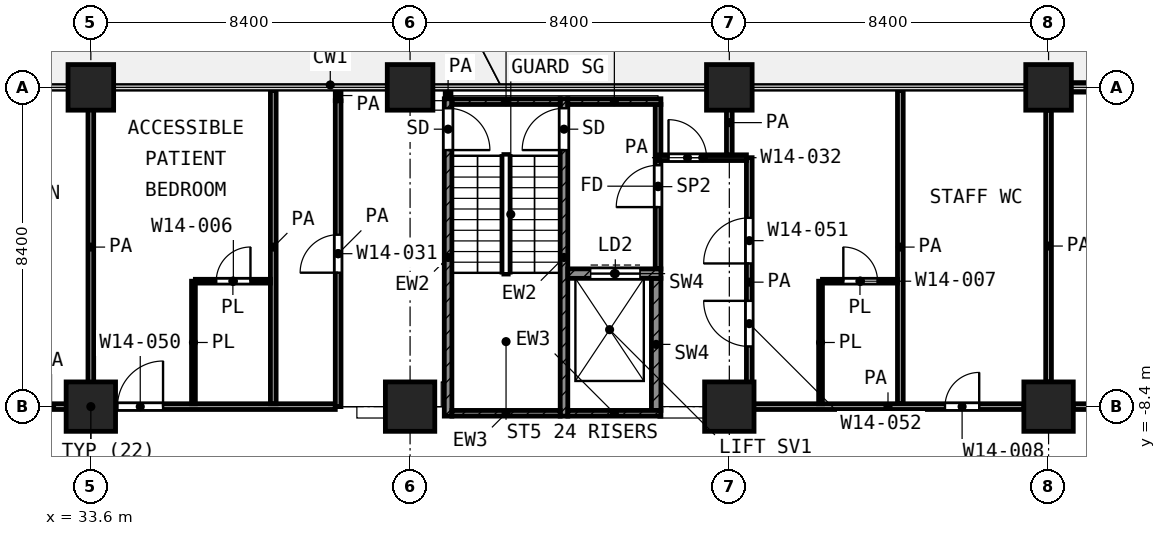
"""IFC4 building model, lengths in metres.
Left out: names, types, materials, properties, quantities, classifications, styles, units other than length and angle.
Written with IfcOpenShell. Run it as: python <this file> out.ifc"""

import sys

from ifc_helpers import new_model, si_unit, direction, frame, frame_2d, origin, origin_2d, place, context, subcontext, project, spatial, rectangle, extrude, element, fill, save


model = new_model("IFC4")
c1 = context("Model", 3, precision=1e-05, world=origin(), true_north=direction((0.0, 1.0)))
c2 = subcontext(c1, "Body", "Model", "MODEL_VIEW")
j1 = project(units=[si_unit("LENGTHUNIT", "METRE"), si_unit("PLANEANGLEUNIT", "RADIAN")], contexts=[c1])
p1 = place(None, origin())
s1 = spatial("IfcSite", under=j1, at=p1, CompositionType="ELEMENT")
p2 = place(p1, origin())
s2 = spatial("IfcBuilding", under=s1, at=p2, CompositionType="ELEMENT")
p3 = place(p2, frame((0.0, 0.0, 64.4)))
s3 = spatial("IfcBuildingStorey", under=s2, at=p3, CompositionType="ELEMENT", Elevation=64.4)
for number, where, z_axis, x_axis in (
    (1, (33.6, 0.0, 0.0), (0.0, 0.0, 1.0), (1.0, 0.0, 0.0)),
    (2, (42.0, 0.0, 0.0), (0.0, 0.0, 1.0), (1.0, 0.0, 0.0)),
    (3, (50.4, 0.0, 0.0), (0.0, 0.0, 1.0), (1.0, 0.0, 0.0)),
    (4, (58.8, 0.0, 0.0), (0.0, 0.0, 1.0), (1.0, 0.0, 0.0)),
):
    element("IfcColumn", number, at=place(p3, frame(where, z_axis=z_axis, x_axis=x_axis)), inside=s3, PredefinedType="COLUMN", context=c2, shape_type="SweptSolid", body=[
        extrude(rectangle(XDim=1.2, YDim=1.2, at=origin_2d()), origin(), (0.0, 0.0, 1.0), 4.2),
    ])
for number, where, z_axis, x_axis in (
    (5, (33.6, -8.4, 0.0), (0.0, 0.0, 1.0), (1.0, 0.0, 0.0)),
    (6, (42.0, -8.4, 0.0), (0.0, 0.0, 1.0), (1.0, 0.0, 0.0)),
    (7, (50.4, -8.4, 0.0), (0.0, 0.0, 1.0), (1.0, 0.0, 0.0)),
    (8, (58.8, -8.4, 0.0), (0.0, 0.0, 1.0), (1.0, 0.0, 0.0)),
):
    element("IfcColumn", number, at=place(p3, frame(where, z_axis=z_axis, x_axis=x_axis)), inside=s3, PredefinedType="COLUMN", context=c2, shape_type="SweptSolid", body=[
        extrude(rectangle(XDim=1.3, YDim=1.3, at=origin_2d()), origin(), (0.0, 0.0, 1.0), 4.2),
    ])
p4 = place(p3, frame((63.0, 0.0, 0.0), z_axis=(0.0, 0.0, 1.0), x_axis=(-1.0, 0.0, 0.0)))
e9 = element("IfcWall", 9, at=p4, inside=s3, PredefinedType="SOLIDWALL", context=c2, shape_type="SweptSolid", body=[
    extrude(rectangle(XDim=3.6, YDim=0.25, at=frame_2d((1.8, 0.0))), origin(), (0.0, 0.0, 1.0), 3.78),
])
p5 = place(p4, frame((0.9, 0.0, 0.0)))
e10 = element("IfcOpeningElement", 10, at=p5, cuts=e9, PredefinedType="OPENING", context=c2, shape_type="SweptSolid", body=[
    extrude(rectangle(XDim=1.8, YDim=2.1, at=frame_2d((0.9, 1.05))), frame((0.0, 0.135, 0.0), z_axis=(0.0, -1.0, 0.0), x_axis=(1.0, 0.0, 0.0)), (0.0, 0.0, 1.0), 0.27),
])
p6 = place(p3, frame((43.0, -8.65, 0.0), z_axis=(0.0, 0.0, 1.0), x_axis=(0.0, 1.0, 0.0)))
e11 = element("IfcWall", 11, at=p6, inside=s3, PredefinedType="SHEAR", context=c2, shape_type="SweptSolid", body=[
    extrude(rectangle(XDim=8.35, YDim=0.2, at=frame_2d((4.175, 0.0))), origin(), (0.0, 0.0, 1.0), 3.9),
])
p7 = place(p6, frame((7.0, 0.0, 0.0)))
e12 = element("IfcOpeningElement", 12, at=p7, cuts=e11, PredefinedType="OPENING", context=c2, shape_type="SweptSolid", body=[
    extrude(rectangle(XDim=1.1, YDim=2.1, at=frame_2d((0.55, 1.05))), frame((0.0, 0.11, 0.0), z_axis=(0.0, -1.0, 0.0), x_axis=(1.0, 0.0, 0.0)), (0.0, 0.0, 1.0), 0.22),
])
p8 = place(p3, frame((46.05, -8.65, 0.0), z_axis=(0.0, 0.0, 1.0), x_axis=(0.0, 1.0, 0.0)))
e13 = element("IfcWall", 13, at=p8, inside=s3, PredefinedType="SHEAR", context=c2, shape_type="SweptSolid", body=[
    extrude(rectangle(XDim=8.35, YDim=0.2, at=frame_2d((4.175, 0.0))), origin(), (0.0, 0.0, 1.0), 3.9),
])
p9 = place(p8, frame((7.0, 0.0, 0.0)))
e14 = element("IfcOpeningElement", 14, at=p9, cuts=e13, PredefinedType="OPENING", context=c2, shape_type="SweptSolid", body=[
    extrude(rectangle(XDim=1.1, YDim=2.1, at=frame_2d((0.55, 1.05))), frame((0.0, 0.11, 0.0), z_axis=(0.0, -1.0, 0.0), x_axis=(1.0, 0.0, 0.0)), (0.0, 0.0, 1.0), 0.22),
])
p10 = place(p3, frame((43.1, -0.375, 0.0), z_axis=(0.0, 0.0, 1.0), x_axis=(1.0, 0.0, 0.0)))
e15 = element("IfcWall", 15, at=p10, inside=s3, PredefinedType="SHEAR", context=c2, shape_type="SweptSolid", body=[
    extrude(rectangle(XDim=2.85, YDim=0.15, at=frame_2d((1.425, 0.0))), origin(), (0.0, 0.0, 1.0), 3.9),
])
p11 = place(p3, frame((46.15, -0.375, 0.0), z_axis=(0.0, 0.0, 1.0), x_axis=(1.0, 0.0, 0.0)))
e16 = element("IfcWall", 16, at=p11, inside=s3, PredefinedType="SHEAR", context=c2, shape_type="SweptSolid", body=[
    extrude(rectangle(XDim=2.45, YDim=0.15, at=frame_2d((1.225, 0.0))), origin(), (0.0, 0.0, 1.0), 3.9),
])
p12 = place(p3, frame((43.1, -8.575, 0.0), z_axis=(0.0, 0.0, 1.0), x_axis=(1.0, 0.0, 0.0)))
e17 = element("IfcWall", 17, at=p12, inside=s3, PredefinedType="SHEAR", context=c2, shape_type="SweptSolid", body=[
    extrude(rectangle(XDim=2.85, YDim=0.15, at=frame_2d((1.425, 0.0))), origin(), (0.0, 0.0, 1.0), 3.9),
])
p13 = place(p3, frame((46.15, -8.575, 0.0), z_axis=(0.0, 0.0, 1.0), x_axis=(1.0, 0.0, 0.0)))
e18 = element("IfcWall", 18, at=p13, inside=s3, PredefinedType="SHEAR", context=c2, shape_type="SweptSolid", body=[
    extrude(rectangle(XDim=2.45, YDim=0.15, at=frame_2d((1.225, 0.0))), origin(), (0.0, 0.0, 1.0), 3.9),
])
p14 = place(p3, frame((46.15, -4.9, 0.0), z_axis=(0.0, 0.0, 1.0), x_axis=(1.0, 0.0, 0.0)))
e19 = element("IfcWall", 19, at=p14, inside=s3, PredefinedType="SHEAR", context=c2, shape_type="SweptSolid", body=[
    extrude(rectangle(XDim=2.45, YDim=0.25, at=frame_2d((1.225, 0.0))), origin(), (0.0, 0.0, 1.0), 3.9),
])
p15 = place(p14, frame((0.6, 0.0, 0.0)))
e20 = element("IfcOpeningElement", 20, at=p15, cuts=e19, PredefinedType="OPENING", context=c2, shape_type="SweptSolid", body=[
    extrude(rectangle(XDim=1.3, YDim=2.1, at=frame_2d((0.65, 1.05))), frame((0.0, 0.135, 0.0), z_axis=(0.0, -1.0, 0.0), x_axis=(1.0, 0.0, 0.0)), (0.0, 0.0, 1.0), 0.27),
])
p16 = place(p3, frame((48.475, -8.5, 0.0), z_axis=(0.0, 0.0, 1.0), x_axis=(0.0, 1.0, 0.0)))
e21 = element("IfcWall", 21, at=p16, inside=s3, PredefinedType="SHEAR", context=c2, shape_type="SweptSolid", body=[
    extrude(rectangle(XDim=3.475, YDim=0.25, at=frame_2d((1.738, 0.0))), origin(), (0.0, 0.0, 1.0), 3.9),
])
p17 = place(p3, frame((48.525, -4.775, 0.0), z_axis=(0.0, 0.0, 1.0), x_axis=(0.0, 1.0, 0.0)))
e22 = element("IfcWall", 22, at=p17, inside=s3, PredefinedType="PARTITIONING", context=c2, shape_type="SweptSolid", body=[
    extrude(rectangle(XDim=4.325, YDim=0.15, at=frame_2d((2.163, 0.0))), origin(), (0.0, 0.0, 1.0), 3.9),
])
p18 = place(p17, frame((1.625, 0.0, 0.0)))
e23 = element("IfcOpeningElement", 23, at=p18, cuts=e22, PredefinedType="OPENING", context=c2, shape_type="SweptSolid", body=[
    extrude(rectangle(XDim=1.1, YDim=2.1, at=frame_2d((0.55, 1.05))), frame((0.0, 0.085, 0.0), z_axis=(0.0, -1.0, 0.0), x_axis=(1.0, 0.0, 0.0)), (0.0, 0.0, 1.0), 0.17),
])
p19 = place(p3, frame((36.35, -5.1, 0.0), z_axis=(0.0, 0.0, 1.0), x_axis=(1.0, 0.0, 0.0)))
e24 = element("IfcWall", 24, at=p19, inside=s3, PredefinedType="PARTITIONING", context=c2, shape_type="SweptSolid", body=[
    extrude(rectangle(XDim=1.975, YDim=0.1, at=frame_2d((0.987, 0.0))), origin(), (0.0, 0.0, 1.0), 3.9),
])
p20 = place(p19, frame((0.55, 0.0, 0.0)))
e25 = element("IfcOpeningElement", 25, at=p20, cuts=e24, PredefinedType="OPENING", context=c2, shape_type="SweptSolid", body=[
    extrude(rectangle(XDim=0.9, YDim=2.1, at=frame_2d((0.45, 1.05))), frame((0.0, 0.06, 0.0), z_axis=(0.0, -1.0, 0.0), x_axis=(1.0, 0.0, 0.0)), (0.0, 0.0, 1.0), 0.12),
])
p21 = place(p3, frame((52.85, -5.1, 0.0), z_axis=(0.0, 0.0, 1.0), x_axis=(1.0, 0.0, 0.0)))
e26 = element("IfcWall", 26, at=p21, inside=s3, PredefinedType="PARTITIONING", context=c2, shape_type="SweptSolid", body=[
    extrude(rectangle(XDim=1.975, YDim=0.1, at=frame_2d((0.987, 0.0))), origin(), (0.0, 0.0, 1.0), 3.9),
])
p22 = place(p21, frame((0.55, 0.0, 0.0)))
e27 = element("IfcOpeningElement", 27, at=p22, cuts=e26, PredefinedType="OPENING", context=c2, shape_type="SweptSolid", body=[
    extrude(rectangle(XDim=0.9, YDim=2.1, at=frame_2d((0.45, 1.05))), frame((0.0, 0.06, 0.0), z_axis=(0.0, -1.0, 0.0), x_axis=(1.0, 0.0, 0.0)), (0.0, 0.0, 1.0), 0.12),
])
for number, where, z_axis, x_axis in (
    (28, (36.3, -8.325, 0.0), (0.0, 0.0, 1.0), (0.0, 1.0, 0.0)),
    (29, (52.8, -8.325, 0.0), (0.0, 0.0, 1.0), (0.0, 1.0, 0.0)),
):
    element("IfcWall", number, at=place(p3, frame(where, z_axis=z_axis, x_axis=x_axis)), inside=s3, PredefinedType="PARTITIONING", context=c2, shape_type="SweptSolid", body=[
        extrude(rectangle(XDim=3.225, YDim=0.1, at=frame_2d((1.612, 0.0))), origin(), (0.0, 0.0, 1.0), 3.9),
    ])
p23 = place(p3, frame((25.1, -8.4, 0.0), z_axis=(0.0, 0.0, 1.0), x_axis=(1.0, 0.0, 0.0)))
e30 = element("IfcWall", 30, at=p23, inside=s3, PredefinedType="PARTITIONING", context=c2, shape_type="SweptSolid", body=[
    extrude(rectangle(XDim=14.932, YDim=0.15, at=frame_2d((7.466, 0.0))), origin(), (0.0, 0.0, 1.0), 3.9),
])
p24 = place(p23, frame((1.75, 0.0, 0.0)))
e31 = element("IfcOpeningElement", 31, at=p24, cuts=e30, PredefinedType="OPENING", context=c2, shape_type="SweptSolid", body=[
    extrude(rectangle(XDim=0.9, YDim=2.1, at=frame_2d((0.45, 1.05))), frame((0.0, 0.085, 0.0), z_axis=(0.0, -1.0, 0.0), x_axis=(1.0, 0.0, 0.0)), (0.0, 0.0, 1.0), 0.17),
])
p25 = place(p23, frame((5.8, 0.0, 0.0)))
e32 = element("IfcOpeningElement", 32, at=p25, cuts=e30, PredefinedType="OPENING", context=c2, shape_type="SweptSolid", body=[
    extrude(rectangle(XDim=1.2, YDim=2.1, at=frame_2d((0.6, 1.05))), frame((0.0, 0.085, 0.0), z_axis=(0.0, -1.0, 0.0), x_axis=(1.0, 0.0, 0.0)), (0.0, 0.0, 1.0), 0.17),
])
p26 = place(p23, frame((9.2, 0.0, 0.0)))
e33 = element("IfcOpeningElement", 33, at=p26, cuts=e30, PredefinedType="OPENING", context=c2, shape_type="SweptSolid", body=[
    extrude(rectangle(XDim=1.2, YDim=2.1, at=frame_2d((0.6, 1.05))), frame((0.0, 0.085, 0.0), z_axis=(0.0, -1.0, 0.0), x_axis=(1.0, 0.0, 0.0)), (0.0, 0.0, 1.0), 0.17),
])
p27 = place(p3, frame((51.0, -8.4, 0.0), z_axis=(0.0, 0.0, 1.0), x_axis=(1.0, 0.0, 0.0)))
e34 = element("IfcWall", 34, at=p27, inside=s3, PredefinedType="PARTITIONING", context=c2, shape_type="SweptSolid", body=[
    extrude(rectangle(XDim=7.15, YDim=0.15, at=frame_2d((3.575, 0.0))), origin(), (0.0, 0.0, 1.0), 3.9),
])
p28 = place(p27, frame((5.075, 0.0, 0.0)))
e35 = element("IfcOpeningElement", 35, at=p28, cuts=e34, PredefinedType="OPENING", context=c2, shape_type="SweptSolid", body=[
    extrude(rectangle(XDim=0.9, YDim=2.1, at=frame_2d((0.45, 1.05))), frame((0.0, 0.085, 0.0), z_axis=(0.0, -1.0, 0.0), x_axis=(1.0, 0.0, 0.0)), (0.0, 0.0, 1.0), 0.17),
])
p29 = place(p3, frame((59.45, -8.4, 0.0), z_axis=(0.0, 0.0, 1.0), x_axis=(1.0, 0.0, 0.0)))
e36 = element("IfcWall", 36, at=p29, inside=s3, PredefinedType="PARTITIONING", context=c2, shape_type="SweptSolid", body=[
    extrude(rectangle(XDim=20.27, YDim=0.15, at=frame_2d((10.135, 0.0))), origin(), (0.0, 0.0, 1.0), 3.9),
])
p30 = place(p29, frame((0.383, 0.0, 0.0)))
e37 = element("IfcOpeningElement", 37, at=p30, cuts=e36, PredefinedType="OPENING", context=c2, shape_type="SweptSolid", body=[
    extrude(rectangle(XDim=1.2, YDim=2.1, at=frame_2d((0.6, 1.05))), frame((0.0, 0.085, 0.0), z_axis=(0.0, -1.0, 0.0), x_axis=(1.0, 0.0, 0.0)), (0.0, 0.0, 1.0), 0.17),
])
p31 = place(p29, frame((5.85, 0.0, 0.0)))
e38 = element("IfcOpeningElement", 38, at=p31, cuts=e36, PredefinedType="OPENING", context=c2, shape_type="SweptSolid", body=[
    extrude(rectangle(XDim=1.2, YDim=2.1, at=frame_2d((0.6, 1.05))), frame((0.0, 0.085, 0.0), z_axis=(0.0, -1.0, 0.0), x_axis=(1.0, 0.0, 0.0)), (0.0, 0.0, 1.0), 0.17),
])
p32 = place(p29, frame((8.45, 0.0, 0.0)))
e39 = element("IfcOpeningElement", 39, at=p32, cuts=e36, PredefinedType="OPENING", context=c2, shape_type="SweptSolid", body=[
    extrude(rectangle(XDim=1.2, YDim=2.1, at=frame_2d((0.6, 1.05))), frame((0.0, 0.085, 0.0), z_axis=(0.0, -1.0, 0.0), x_axis=(1.0, 0.0, 0.0)), (0.0, 0.0, 1.0), 0.17),
])
p33 = place(p29, frame((13.9, 0.0, 0.0)))
e40 = element("IfcOpeningElement", 40, at=p33, cuts=e36, PredefinedType="OPENING", context=c2, shape_type="SweptSolid", body=[
    extrude(rectangle(XDim=1.5, YDim=2.1, at=frame_2d((0.75, 1.05))), frame((0.0, 0.085, 0.0), z_axis=(0.0, -1.0, 0.0), x_axis=(1.0, 0.0, 0.0)), (0.0, 0.0, 1.0), 0.17),
])
p34 = place(p3, frame((48.55, -1.85, 0.0), z_axis=(0.0, 0.0, 1.0), x_axis=(1.0, 0.0, 0.0)))
e41 = element("IfcWall", 41, at=p34, inside=s3, PredefinedType="PARTITIONING", context=c2, shape_type="SweptSolid", body=[
    extrude(rectangle(XDim=2.3, YDim=0.15, at=frame_2d((1.15, 0.0))), origin(), (0.0, 0.0, 1.0), 3.9),
])
p35 = place(p34, frame((0.25, 0.0, 0.0)))
e42 = element("IfcOpeningElement", 42, at=p35, cuts=e41, PredefinedType="OPENING", context=c2, shape_type="SweptSolid", body=[
    extrude(rectangle(XDim=1.0, YDim=2.1, at=frame_2d((0.5, 1.05))), frame((0.0, 0.085, 0.0), z_axis=(0.0, -1.0, 0.0), x_axis=(1.0, 0.0, 0.0)), (0.0, 0.0, 1.0), 0.17),
])
for number, where, z_axis, x_axis in (
    (43, (33.6, -8.325, 0.0), (0.0, 0.0, 1.0), (0.0, 1.0, 0.0)),
    (44, (38.4, -8.325, 0.0), (0.0, 0.0, 1.0), (0.0, 1.0, 0.0)),
):
    element("IfcWall", number, at=place(p3, frame(where, z_axis=z_axis, x_axis=x_axis)), inside=s3, PredefinedType="PARTITIONING", context=c2, shape_type="SweptSolid", body=[
        extrude(rectangle(XDim=8.245, YDim=0.15, at=frame_2d((4.123, 0.0))), origin(), (0.0, 0.0, 1.0), 3.9),
    ])
p36 = place(p3, frame((40.107, -8.4, 0.0), z_axis=(0.0, 0.0, 1.0), x_axis=(0.0, 1.0, 0.0)))
e45 = element("IfcWall", 45, at=p36, inside=s3, PredefinedType="PARTITIONING", context=c2, shape_type="SweptSolid", body=[
    extrude(rectangle(XDim=8.048, YDim=0.15, at=frame_2d((4.024, 0.0))), origin(), (0.0, 0.0, 1.0), 3.9),
])
p37 = place(p36, frame((3.524, 0.0, 0.0)))
e46 = element("IfcOpeningElement", 46, at=p37, cuts=e45, PredefinedType="OPENING", context=c2, shape_type="SweptSolid", body=[
    extrude(rectangle(XDim=1.0, YDim=2.1, at=frame_2d((0.5, 1.05))), frame((0.0, 0.085, 0.0), z_axis=(0.0, -1.0, 0.0), x_axis=(1.0, 0.0, 0.0)), (0.0, 0.0, 1.0), 0.17),
])
p38 = place(p3, frame((40.107, -0.35, 0.0), z_axis=(0.0, 0.0, 1.0), x_axis=(0.0, 1.0, 0.0)))
e47 = element("IfcWall", 47, at=p38, inside=s3, PredefinedType="PARTITIONING", context=c2, shape_type="SweptSolid", body=[
    extrude(rectangle(XDim=0.27, YDim=0.15, at=frame_2d((0.135, 0.0))), origin(), (0.0, 0.0, 1.0), 3.9),
])
p39 = place(p3, frame((43.0, -0.27, 0.0), z_axis=(0.0, 0.0, 1.0), x_axis=(0.0, 1.0, 0.0)))
e48 = element("IfcWall", 48, at=p39, inside=s3, PredefinedType="PARTITIONING", context=c2, shape_type="SweptSolid", body=[
    extrude(rectangle(XDim=0.19, YDim=0.15, at=frame_2d((0.095, 0.0))), origin(), (0.0, 0.0, 1.0), 3.9),
])
p40 = place(p3, frame((50.4, -1.775, 0.0), z_axis=(0.0, 0.0, 1.0), x_axis=(0.0, 1.0, 0.0)))
e49 = element("IfcWall", 49, at=p40, inside=s3, PredefinedType="PARTITIONING", context=c2, shape_type="SweptSolid", body=[
    extrude(rectangle(XDim=1.695, YDim=0.15, at=frame_2d((0.847, 0.0))), origin(), (0.0, 0.0, 1.0), 3.9),
])
p41 = place(p3, frame((50.925, -8.4, 0.0), z_axis=(0.0, 0.0, 1.0), x_axis=(0.0, 1.0, 0.0)))
e50 = element("IfcWall", 50, at=p41, inside=s3, PredefinedType="PARTITIONING", context=c2, shape_type="SweptSolid", body=[
    extrude(rectangle(XDim=6.55, YDim=0.15, at=frame_2d((3.275, 0.0))), origin(), (0.0, 0.0, 1.0), 3.9),
])
p42 = place(p41, frame((3.767, 0.0, 0.0)))
e51 = element("IfcOpeningElement", 51, at=p42, cuts=e50, PredefinedType="OPENING", context=c2, shape_type="SweptSolid", body=[
    extrude(rectangle(XDim=1.2, YDim=2.1, at=frame_2d((0.6, 1.05))), frame((0.0, 0.085, 0.0), z_axis=(0.0, -1.0, 0.0), x_axis=(1.0, 0.0, 0.0)), (0.0, 0.0, 1.0), 0.17),
])
p43 = place(p41, frame((1.583, 0.0, 0.0)))
e52 = element("IfcOpeningElement", 52, at=p43, cuts=e50, PredefinedType="OPENING", context=c2, shape_type="SweptSolid", body=[
    extrude(rectangle(XDim=1.2, YDim=2.1, at=frame_2d((0.6, 1.05))), frame((0.0, 0.085, 0.0), z_axis=(0.0, -1.0, 0.0), x_axis=(1.0, 0.0, 0.0)), (0.0, 0.0, 1.0), 0.17),
])
p44 = place(p3, frame((54.9, -8.325, 0.0), z_axis=(0.0, 0.0, 1.0), x_axis=(0.0, 1.0, 0.0)))
e53 = element("IfcWall", 53, at=p44, inside=s3, PredefinedType="PARTITIONING", context=c2, shape_type="SweptSolid", body=[
    extrude(rectangle(XDim=8.245, YDim=0.15, at=frame_2d((4.123, 0.0))), origin(), (0.0, 0.0, 1.0), 3.9),
])
p45 = place(p3, frame((58.8, -7.75, 0.0), z_axis=(0.0, 0.0, 1.0), x_axis=(0.0, 1.0, 0.0)))
e54 = element("IfcWall", 54, at=p45, inside=s3, PredefinedType="PARTITIONING", context=c2, shape_type="SweptSolid", body=[
    extrude(rectangle(XDim=7.15, YDim=0.15, at=frame_2d((3.575, 0.0))), origin(), (0.0, 0.0, 1.0), 3.9),
])
p46 = place(p7, frame((1.1, 0.0, 0.0), z_axis=(0.0, 0.0, 1.0), x_axis=(-1.0, 0.0, 0.0)))
e55 = element("IfcDoor", 55, at=p46, inside=s3, OperationType="SINGLE_SWING_LEFT", PredefinedType="DOOR", context=c2, shape_type="SweptSolid", body=[
    extrude(rectangle(XDim=1.1, YDim=2.1, at=frame_2d((0.55, 1.05))), frame((0.0, 0.025, 0.0), z_axis=(0.0, -1.0, 0.0), x_axis=(1.0, 0.0, 0.0)), (0.0, 0.0, 1.0), 0.05),
])
fill(e12, e55)
p47 = place(p9, origin())
e56 = element("IfcDoor", 56, at=p47, inside=s3, OperationType="SINGLE_SWING_LEFT", PredefinedType="DOOR", context=c2, shape_type="SweptSolid", body=[
    extrude(rectangle(XDim=1.1, YDim=2.1, at=frame_2d((0.55, 1.05))), frame((0.0, 0.025, 0.0), z_axis=(0.0, -1.0, 0.0), x_axis=(1.0, 0.0, 0.0)), (0.0, 0.0, 1.0), 0.05),
])
fill(e14, e56)
p48 = place(p15, origin())
e57 = element("IfcDoor", 57, at=p48, inside=s3, OperationType="DOUBLE_DOOR_SLIDING", PredefinedType="DOOR", context=c2, shape_type="SweptSolid", body=[
    extrude(rectangle(XDim=1.3, YDim=2.1, at=frame_2d((0.65, 1.05))), frame((0.0, 0.025, 0.0), z_axis=(0.0, -1.0, 0.0), x_axis=(1.0, 0.0, 0.0)), (0.0, 0.0, 1.0), 0.05),
])
fill(e20, e57)
p49 = place(p18, origin())
e58 = element("IfcDoor", 58, at=p49, inside=s3, OperationType="SINGLE_SWING_LEFT", PredefinedType="DOOR", context=c2, shape_type="SweptSolid", body=[
    extrude(rectangle(XDim=1.1, YDim=2.1, at=frame_2d((0.55, 1.05))), frame((0.0, 0.025, 0.0), z_axis=(0.0, -1.0, 0.0), x_axis=(1.0, 0.0, 0.0)), (0.0, 0.0, 1.0), 0.05),
])
fill(e23, e58)
p50 = place(p26, origin())
e59 = element("IfcDoor", 59, at=p50, inside=s3, OperationType="SINGLE_SWING_RIGHT", PredefinedType="DOOR", context=c2, shape_type="SweptSolid", body=[
    extrude(rectangle(XDim=1.2, YDim=2.1, at=frame_2d((0.6, 1.05))), frame((0.0, 0.025, 0.0), z_axis=(0.0, -1.0, 0.0), x_axis=(1.0, 0.0, 0.0)), (0.0, 0.0, 1.0), 0.05),
])
fill(e33, e59)
p51 = place(p20, origin())
e60 = element("IfcDoor", 60, at=p51, inside=s3, OperationType="SINGLE_SWING_RIGHT", PredefinedType="DOOR", context=c2, shape_type="SweptSolid", body=[
    extrude(rectangle(XDim=0.9, YDim=2.1, at=frame_2d((0.45, 1.05))), frame((0.0, 0.025, 0.0), z_axis=(0.0, -1.0, 0.0), x_axis=(1.0, 0.0, 0.0)), (0.0, 0.0, 1.0), 0.05),
])
fill(e25, e60)
p52 = place(p37, origin())
e61 = element("IfcDoor", 61, at=p52, inside=s3, OperationType="SINGLE_SWING_LEFT", PredefinedType="DOOR", context=c2, shape_type="SweptSolid", body=[
    extrude(rectangle(XDim=1.0, YDim=2.1, at=frame_2d((0.5, 1.05))), frame((0.0, 0.025, 0.0), z_axis=(0.0, -1.0, 0.0), x_axis=(1.0, 0.0, 0.0)), (0.0, 0.0, 1.0), 0.05),
])
fill(e46, e61)
p53 = place(p35, origin())
e62 = element("IfcDoor", 62, at=p53, inside=s3, OperationType="SINGLE_SWING_LEFT", PredefinedType="DOOR", context=c2, shape_type="SweptSolid", body=[
    extrude(rectangle(XDim=1.0, YDim=2.1, at=frame_2d((0.5, 1.05))), frame((0.0, 0.025, 0.0), z_axis=(0.0, -1.0, 0.0), x_axis=(1.0, 0.0, 0.0)), (0.0, 0.0, 1.0), 0.05),
])
fill(e42, e62)
p54 = place(p42, origin())
e63 = element("IfcDoor", 63, at=p54, inside=s3, OperationType="SINGLE_SWING_LEFT", PredefinedType="DOOR", context=c2, shape_type="SweptSolid", body=[
    extrude(rectangle(XDim=1.2, YDim=2.1, at=frame_2d((0.6, 1.05))), frame((0.0, 0.025, 0.0), z_axis=(0.0, -1.0, 0.0), x_axis=(1.0, 0.0, 0.0)), (0.0, 0.0, 1.0), 0.05),
])
fill(e51, e63)
p55 = place(p43, origin())
e64 = element("IfcDoor", 64, at=p55, inside=s3, OperationType="SINGLE_SWING_RIGHT", PredefinedType="DOOR", context=c2, shape_type="SweptSolid", body=[
    extrude(rectangle(XDim=1.2, YDim=2.1, at=frame_2d((0.6, 1.05))), frame((0.0, 0.025, 0.0), z_axis=(0.0, -1.0, 0.0), x_axis=(1.0, 0.0, 0.0)), (0.0, 0.0, 1.0), 0.05),
])
fill(e52, e64)
p56 = place(p22, origin())
e65 = element("IfcDoor", 65, at=p56, inside=s3, OperationType="SINGLE_SWING_LEFT", PredefinedType="DOOR", context=c2, shape_type="SweptSolid", body=[
    extrude(rectangle(XDim=0.9, YDim=2.1, at=frame_2d((0.45, 1.05))), frame((0.0, 0.025, 0.0), z_axis=(0.0, -1.0, 0.0), x_axis=(1.0, 0.0, 0.0)), (0.0, 0.0, 1.0), 0.05),
])
fill(e27, e65)
p57 = place(p28, origin())
e66 = element("IfcDoor", 66, at=p57, inside=s3, OperationType="SINGLE_SWING_RIGHT", PredefinedType="DOOR", context=c2, shape_type="SweptSolid", body=[
    extrude(rectangle(XDim=0.9, YDim=2.1, at=frame_2d((0.45, 1.05))), frame((0.0, 0.025, 0.0), z_axis=(0.0, -1.0, 0.0), x_axis=(1.0, 0.0, 0.0)), (0.0, 0.0, 1.0), 0.05),
])
fill(e35, e66)
save(model, sys.argv[1])
